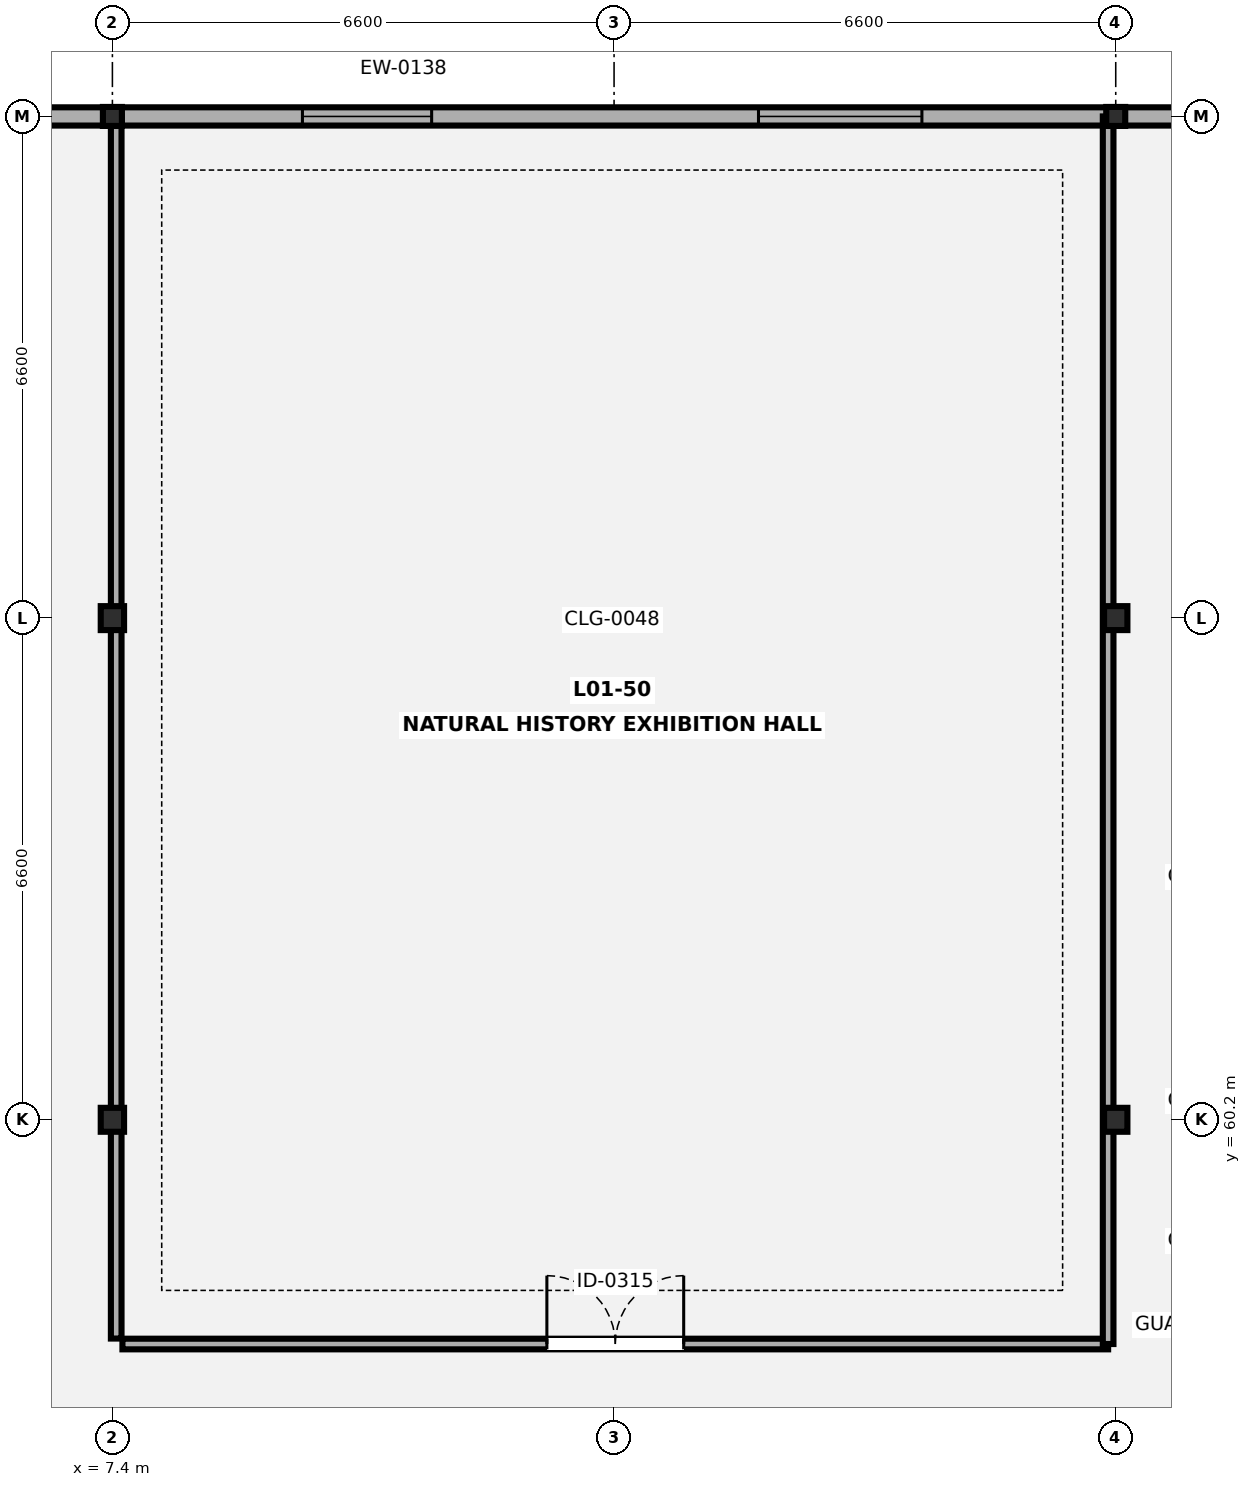
"""IFC4 building model, lengths in metres.
Left out: names, types, materials, properties, quantities, classifications, styles, units other than length and angle.
Written with IfcOpenShell. Run it as: python <this file> out.ifc"""

import sys

from ifc_helpers import new_model, si_unit, direction, frame, frame_2d, origin, origin_2d, place, context, subcontext, project, spatial, rectangle, hollow_rectangle, i_section, extrude, element, fill, save


model = new_model("IFC4")
c1 = context("Model", 3, precision=1e-05, world=origin(), true_north=direction((0.0, 1.0)))
c2 = subcontext(c1, "Body", "Model", "MODEL_VIEW")
j1 = project(units=[si_unit("LENGTHUNIT", "METRE"), si_unit("PLANEANGLEUNIT", "RADIAN")], contexts=[c1])
p1 = place(None, origin())
s1 = spatial("IfcSite", under=j1, at=p1, CompositionType="ELEMENT")
p2 = place(p1, origin())
s2 = spatial("IfcBuilding", under=s1, at=p2, CompositionType="ELEMENT")
p3 = place(p2, frame((0.0, 0.0, 4.9)))
s3 = spatial("IfcBuildingStorey", under=s2, at=p3, CompositionType="ELEMENT", Elevation=4.9)
for number, where, z_axis, x_axis in (
    (1, (7.4, 60.2, 0.0), (0.0, 0.0, 1.0), (1.0, 0.0, 0.0)),
    (2, (7.4, 66.8, 0.0), (0.0, 0.0, 1.0), (1.0, 0.0, 0.0)),
):
    element("IfcColumn", number, at=place(p3, frame(where, z_axis=z_axis, x_axis=x_axis)), inside=s3, PredefinedType="COLUMN", context=c2, shape_type="SweptSolid", body=[
        extrude(i_section(OverallWidth=0.307, OverallDepth=0.315, WebThickness=0.012, FlangeThickness=0.019, FilletRadius=0.017, at=origin_2d()), origin(), (0.0, 0.0, 1.0), 4.2),
    ])
p4 = place(p3, frame((7.4, 73.4, 0.0), z_axis=(0.0, 0.0, 1.0), x_axis=(1.0, 0.0, 0.0)))
e3 = element("IfcColumn", 3, at=p4, inside=s3, PredefinedType="COLUMN", context=c2, shape_type="SweptSolid", body=[
    extrude(hollow_rectangle(XDim=0.25, YDim=0.25, WallThickness=0.012, at=origin_2d()), origin(), (0.0, 0.0, 1.0), 4.2),
])
for number, where, z_axis, x_axis in (
    (4, (20.6, 60.2, 0.0), (0.0, 0.0, 1.0), (1.0, 0.0, 0.0)),
    (5, (20.6, 66.8, 0.0), (0.0, 0.0, 1.0), (1.0, 0.0, 0.0)),
):
    element("IfcColumn", number, at=place(p3, frame(where, z_axis=z_axis, x_axis=x_axis)), inside=s3, PredefinedType="COLUMN", context=c2, shape_type="SweptSolid", body=[
        extrude(i_section(OverallWidth=0.307, OverallDepth=0.315, WebThickness=0.012, FlangeThickness=0.019, FilletRadius=0.017, at=origin_2d()), origin(), (0.0, 0.0, 1.0), 4.2),
    ])
p5 = place(p3, frame((20.6, 73.4, 0.0), z_axis=(0.0, 0.0, 1.0), x_axis=(1.0, 0.0, 0.0)))
e6 = element("IfcColumn", 6, at=p5, inside=s3, PredefinedType="COLUMN", context=c2, shape_type="SweptSolid", body=[
    extrude(hollow_rectangle(XDim=0.25, YDim=0.25, WallThickness=0.012, at=origin_2d()), origin(), (0.0, 0.0, 1.0), 4.2),
])
p6 = place(p3, frame((1.923, 73.4, 0.0), z_axis=(0.0, 0.0, 1.0), x_axis=(1.0, 0.0, 0.0)))
e7 = element("IfcWall", 7, at=p6, inside=s3, PredefinedType="SOLIDWALL", context=c2, shape_type="SweptSolid", body=[
    extrude(rectangle(XDim=25.154, YDim=0.24, at=frame_2d((12.577, 0.0))), origin(), (0.0, 0.0, 1.0), 3.505),
])
p7 = place(p6, frame((7.977, 0.0, 0.85)))
e8 = element("IfcOpeningElement", 8, at=p7, cuts=e7, PredefinedType="OPENING", context=c2, shape_type="SweptSolid", body=[
    extrude(rectangle(XDim=1.7, YDim=1.4, at=frame_2d((0.85, 0.7))), frame((0.0, 0.13, 0.0), z_axis=(0.0, -1.0, 0.0), x_axis=(1.0, 0.0, 0.0)), (0.0, 0.0, 1.0), 0.26),
])
p8 = place(p6, frame((13.977, 0.0, 0.85)))
e9 = element("IfcOpeningElement", 9, at=p8, cuts=e7, PredefinedType="OPENING", context=c2, shape_type="SweptSolid", body=[
    extrude(rectangle(XDim=2.15, YDim=1.4, at=frame_2d((1.075, 0.7))), frame((0.0, 0.13, 0.0), z_axis=(0.0, -1.0, 0.0), x_axis=(1.0, 0.0, 0.0)), (0.0, 0.0, 1.0), 0.26),
])
p9 = place(p3, frame((7.532, 57.25, 0.0), z_axis=(0.0, 0.0, 1.0), x_axis=(1.0, 0.0, 0.0)))
e10 = element("IfcWall", 10, at=p9, inside=s3, PredefinedType="PARTITIONING", context=c2, shape_type="SweptSolid", body=[
    extrude(rectangle(XDim=12.968, YDim=0.14, at=frame_2d((6.484, 0.0))), origin(), (0.0, 0.0, 1.0), 4.0),
])
p10 = place(p9, frame((5.584, 0.0, 0.0)))
e11 = element("IfcOpeningElement", 11, at=p10, cuts=e10, PredefinedType="OPENING", context=c2, shape_type="SweptSolid", body=[
    extrude(rectangle(XDim=1.8, YDim=2.2, at=frame_2d((0.9, 1.1))), frame((0.0, 0.08, 0.0), z_axis=(0.0, -1.0, 0.0), x_axis=(1.0, 0.0, 0.0)), (0.0, 0.0, 1.0), 0.16),
])
p11 = place(p3, frame((7.45, 57.322, 0.0), z_axis=(0.0, 0.0, 1.0), x_axis=(0.0, 1.0, 0.0)))
e12 = element("IfcWall", 12, at=p11, inside=s3, PredefinedType="PARTITIONING", context=c2, shape_type="SweptSolid", body=[
    extrude(rectangle(XDim=16.078, YDim=0.14, at=frame_2d((8.039, 0.0))), origin(), (0.0, 0.0, 1.0), 3.445),
])
p12 = place(p3, frame((20.5, 57.25, 0.0), z_axis=(0.0, 0.0, 1.0), x_axis=(0.0, 1.0, 0.0)))
e13 = element("IfcWall", 13, at=p12, inside=s3, PredefinedType="PARTITIONING", context=c2, shape_type="SweptSolid", body=[
    extrude(rectangle(XDim=16.15, YDim=0.14, at=frame_2d((8.075, 0.0))), origin(), (0.0, 0.0, 1.0), 3.445),
])
p13 = place(p7, origin())
e14 = element("IfcWindow", 14, at=p13, inside=s3, PartitioningType="SINGLE_PANEL", PredefinedType="WINDOW", context=c2, shape_type="SweptSolid", body=[
    extrude(rectangle(XDim=1.7, YDim=1.4, at=frame_2d((0.85, 0.7))), frame((0.0, 0.03, 0.0), z_axis=(0.0, -1.0, 0.0), x_axis=(1.0, 0.0, 0.0)), (0.0, 0.0, 1.0), 0.06),
])
fill(e8, e14)
p14 = place(p8, origin())
e15 = element("IfcWindow", 15, at=p14, inside=s3, PartitioningType="SINGLE_PANEL", PredefinedType="WINDOW", context=c2, shape_type="SweptSolid", body=[
    extrude(rectangle(XDim=2.15, YDim=1.4, at=frame_2d((1.075, 0.7))), frame((0.0, 0.03, 0.0), z_axis=(0.0, -1.0, 0.0), x_axis=(1.0, 0.0, 0.0)), (0.0, 0.0, 1.0), 0.06),
])
fill(e9, e15)
p15 = place(p10, origin())
e16 = element("IfcDoor", 16, at=p15, inside=s3, OperationType="DOUBLE_DOOR_SINGLE_SWING", PredefinedType="DOOR", context=c2, shape_type="SweptSolid", body=[
    extrude(rectangle(XDim=1.8, YDim=2.2, at=frame_2d((0.9, 1.1))), frame((0.0, 0.025, 0.0), z_axis=(0.0, -1.0, 0.0), x_axis=(1.0, 0.0, 0.0)), (0.0, 0.0, 1.0), 0.05),
])
fill(e11, e16)
save(model, sys.argv[1])
